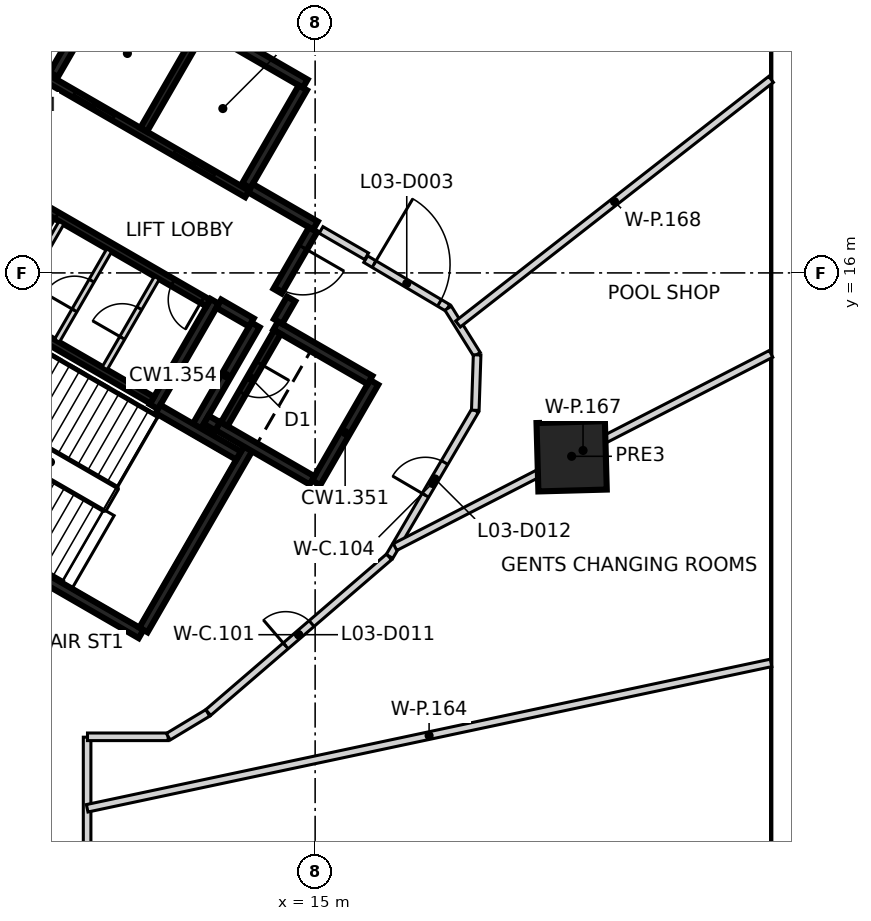
"""IFC4 building model, lengths in metres.
Left out: names, types, materials, properties, quantities, classifications, styles, units other than length and angle.
Written with IfcOpenShell. Run it as: python <this file> out.ifc"""

import sys

from ifc_helpers import new_model, si_unit, direction, frame, frame_2d, origin, origin_2d, place, context, subcontext, project, spatial, rectangle, extrude, element, fill, save


model = new_model("IFC4")
c1 = context("Model", 3, precision=1e-05, world=origin(), true_north=direction((0.0, 1.0)))
c2 = subcontext(c1, "Body", "Model", "MODEL_VIEW")
j1 = project(units=[si_unit("LENGTHUNIT", "METRE"), si_unit("PLANEANGLEUNIT", "RADIAN")], contexts=[c1])
p1 = place(None, origin())
s1 = spatial("IfcSite", under=j1, at=p1, CompositionType="ELEMENT")
p2 = place(p1, origin())
s2 = spatial("IfcBuilding", under=s1, at=p2, CompositionType="ELEMENT")
p3 = place(p2, frame((0.0, 0.0, 19.5)))
s3 = spatial("IfcBuildingStorey", under=s2, at=p3, CompositionType="ELEMENT", Elevation=19.5)
p4 = place(p3, frame((21.749, 11.174, -0.35), z_axis=(0.0, 0.0, 1.0), x_axis=(0.999628128016, 0.02726913418, 0.0)))
e1 = element("IfcColumn", 1, at=p4, inside=s3, PredefinedType="COLUMN", context=c2, shape_type="SweptSolid", body=[
    extrude(rectangle(XDim=1.8, YDim=1.8, at=origin_2d()), origin(), (0.0, 0.0, 1.0), 2.5),
])
p5 = place(p3, frame((10.42, 6.498, 0.0), z_axis=(0.0, 0.0, 1.0), x_axis=(-0.866021906294, 0.500006057782, 0.0)))
e2 = element("IfcWall", 2, at=p5, inside=s3, PredefinedType="SHEAR", context=c2, shape_type="SweptSolid", body=[
    extrude(rectangle(XDim=11.55, YDim=0.25, at=frame_2d((5.775, 0.0))), origin(), (0.0, 0.0, 1.0), 4.55),
])
p6 = place(p5, frame((10.025, 0.0, 0.0)))
e3 = element("IfcOpeningElement", 3, at=p6, cuts=e2, PredefinedType="OPENING", context=c2, shape_type="SweptSolid", body=[
    extrude(rectangle(XDim=1.2, YDim=2.1, at=frame_2d((0.6, 1.05))), frame((0.0, 0.135, 0.0), z_axis=(0.0, -1.0, 0.0), x_axis=(1.0, 0.0, 0.0)), (0.0, 0.0, 1.0), 0.27),
])
p7 = place(p5, frame((8.725, 0.0, 0.0)))
e4 = element("IfcOpeningElement", 4, at=p7, cuts=e2, PredefinedType="OPENING", context=c2, shape_type="SweptSolid", body=[
    extrude(rectangle(XDim=1.2, YDim=2.1, at=frame_2d((0.6, 1.05))), frame((0.0, 0.135, 0.0), z_axis=(0.0, -1.0, 0.0), x_axis=(1.0, 0.0, 0.0)), (0.0, 0.0, 1.0), 0.27),
])
p8 = place(p3, frame((9.673, 23.903, 0.0), z_axis=(0.0, 0.0, 1.0), x_axis=(0.86603616409, -0.499981362141, 0.0)))
e5 = element("IfcWall", 5, at=p8, inside=s3, PredefinedType="SHEAR", context=c2, shape_type="SweptSolid", body=[
    extrude(rectangle(XDim=5.85, YDim=0.25, at=frame_2d((2.925, 0.0))), origin(), (0.0, 0.0, 1.0), 4.55),
])
p9 = place(p3, frame((13.238, 11.378, 0.0), z_axis=(0.0, 0.0, 1.0), x_axis=(-0.500008851346, -0.866020293397, 0.0)))
e6 = element("IfcWall", 6, at=p9, inside=s3, PredefinedType="SHEAR", context=c2, shape_type="SweptSolid", body=[
    extrude(rectangle(XDim=5.51, YDim=0.25, at=frame_2d((2.755, 0.0))), origin(), (0.0, 0.0, 1.0), 4.55),
])
p10 = place(p3, frame((12.357, 15.252, 0.0), z_axis=(0.0, 0.0, 1.0), x_axis=(-0.500028443584, -0.866008981251, 0.0)))
e7 = element("IfcWall", 7, at=p10, inside=s3, PredefinedType="SHEAR", context=c2, shape_type="SweptSolid", body=[
    extrude(rectangle(XDim=3.2, YDim=0.25, at=frame_2d((1.6, 0.0))), origin(), (0.0, 0.0, 1.0), 4.55),
])
for number, where, z_axis, x_axis in (
    (8, (8.123, 21.219, 0.0), (0.0, 0.0, 1.0), (0.5, 0.866, 0.0)),
    (9, (14.676, 20.87, 0.0), (0.0, 0.0, 1.0), (-0.5, -0.866, 0.0)),
):
    element("IfcWall", number, at=place(p3, frame(where, z_axis=z_axis, x_axis=x_axis)), inside=s3, PredefinedType="SHEAR", context=c2, shape_type="SweptSolid", body=[
        extrude(rectangle(XDim=2.975, YDim=0.25, at=frame_2d((1.487, 0.0))), origin(), (0.0, 0.0, 1.0), 4.55),
    ])
p11 = place(p3, frame((16.552, 13.119, 0.0), z_axis=(0.0, 0.0, 1.0), x_axis=(-0.499978833458, -0.866037623948, 0.0)))
e10 = element("IfcWall", 10, at=p11, inside=s3, PredefinedType="SHEAR", context=c2, shape_type="SweptSolid", body=[
    extrude(rectangle(XDim=3.05, YDim=0.25, at=frame_2d((1.525, 0.0))), origin(), (0.0, 0.0, 1.0), 4.55),
])
p12 = place(p3, frame((14.918, 10.54, 0.0), z_axis=(0.0, 0.0, 1.0), x_axis=(-0.866063538972, 0.499933942099, 0.0)))
e11 = element("IfcWall", 11, at=p12, inside=s3, PredefinedType="SHEAR", context=c2, shape_type="SweptSolid", body=[
    extrude(rectangle(XDim=2.865, YDim=0.25, at=frame_2d((1.432, 0.0))), origin(), (0.0, 0.0, 1.0), 4.55),
])
p13 = place(p3, frame((13.963, 14.614, 0.0), z_axis=(0.0, 0.0, 1.0), x_axis=(0.866042235819, -0.499970844928, 0.0)))
e12 = element("IfcWall", 12, at=p13, inside=s3, PredefinedType="SHEAR", context=c2, shape_type="SweptSolid", body=[
    extrude(rectangle(XDim=2.865, YDim=0.25, at=frame_2d((1.432, 0.0))), origin(), (0.0, 0.0, 1.0), 4.55),
])
p14 = place(p3, frame((11.888, 11.961, 0.0), z_axis=(0.0, 0.0, 1.0), x_axis=(0.500003324108, 0.866023484601, 0.0)))
e13 = element("IfcWall", 13, at=p14, inside=s3, PredefinedType="SHEAR", context=c2, shape_type="SweptSolid", body=[
    extrude(rectangle(XDim=3.085, YDim=0.25, at=frame_2d((1.542, 0.0))), origin(), (0.0, 0.0, 1.0), 4.55),
])
p15 = place(p3, frame((10.865, 12.418, 0.0), z_axis=(0.0, 0.0, 1.0), x_axis=(0.866026229868, -0.499998569178, 0.0)))
e14 = element("IfcWall", 14, at=p15, inside=s3, PredefinedType="SHEAR", context=c2, shape_type="SweptSolid", body=[
    extrude(rectangle(XDim=2.449, YDim=0.25, at=frame_2d((1.225, 0.0))), origin(), (0.0, 0.0, 1.0), 4.55),
])
p16 = place(p3, frame((13.297, 18.231, 0.0), z_axis=(0.0, 0.0, 1.0), x_axis=(0.866043531843, -0.499968599967, 0.0)))
e15 = element("IfcWall", 15, at=p16, inside=s3, PredefinedType="SHEAR", context=c2, shape_type="SweptSolid", body=[
    extrude(rectangle(XDim=1.975, YDim=0.25, at=frame_2d((0.987, 0.0))), origin(), (0.0, 0.0, 1.0), 4.55),
])
p17 = place(p3, frame((14.945, 17.135, 0.0), z_axis=(0.0, 0.0, 1.0), x_axis=(-0.499983108224, -0.866035156036, 0.0)))
e16 = element("IfcWall", 16, at=p17, inside=s3, PredefinedType="SHEAR", context=c2, shape_type="SweptSolid", body=[
    extrude(rectangle(XDim=1.865, YDim=0.25, at=frame_2d((0.932, 0.0))), origin(), (0.0, 0.0, 1.0), 4.55),
])
p18 = place(p17, frame((0.535, 0.0, 0.0)))
e17 = element("IfcOpeningElement", 17, at=p18, cuts=e16, PredefinedType="OPENING", context=c2, shape_type="SweptSolid", body=[
    extrude(rectangle(XDim=1.25, YDim=2.1, at=frame_2d((0.625, 1.05))), frame((0.0, 0.135, 0.0), z_axis=(0.0, -1.0, 0.0), x_axis=(1.0, 0.0, 0.0)), (0.0, 0.0, 1.0), 0.27),
])
p19 = place(p3, frame((13.322, 14.695, 0.0), z_axis=(0.0, 0.0, 1.0), x_axis=(-0.866017078145, 0.500014420154, 0.0)))
e18 = element("IfcWall", 18, at=p19, inside=s3, PredefinedType="SHEAR", context=c2, shape_type="SweptSolid", body=[
    extrude(rectangle(XDim=0.989, YDim=0.25, at=frame_2d((0.495, 0.0))), origin(), (0.0, 0.0, 1.0), 4.55),
])
p20 = place(p3, frame((14.368, 15.315, 0.0), z_axis=(0.0, 0.0, 1.0), x_axis=(-0.499897359611, -0.866084655132, 0.0)))
e19 = element("IfcWall", 19, at=p20, inside=s3, PredefinedType="SHEAR", context=c2, shape_type="SweptSolid", body=[
    extrude(rectangle(XDim=0.685, YDim=0.25, at=frame_2d((0.342, 0.0))), origin(), (0.0, 0.0, 1.0), 4.55),
])
p21 = place(p3, frame((12.433, 11.964, 0.0), z_axis=(0.0, 0.0, 1.0), x_axis=(-0.866055875208, 0.499947218231, 0.0)))
e20 = element("IfcWall", 20, at=p21, inside=s3, PredefinedType="SHEAR", context=c2, shape_type="SweptSolid", body=[
    extrude(rectangle(XDim=0.345, YDim=0.25, at=frame_2d((0.172, 0.0))), origin(), (0.0, 0.0, 1.0), 4.55),
])
p22 = place(p3, frame((13.21, 18.08, 0.0), z_axis=(0.0, 0.0, 1.0), x_axis=(-0.866030299012, 0.499991521122, 0.0)))
e21 = element("IfcWall", 21, at=p22, inside=s3, PredefinedType="SHEAR", context=c2, shape_type="SweptSolid", body=[
    extrude(rectangle(XDim=6.1, YDim=0.2, at=frame_2d((3.05, 0.0))), origin(), (0.0, 0.0, 1.0), 4.55),
])
p23 = place(p22, frame((1.0, 0.0, 0.0)))
e22 = element("IfcOpeningElement", 22, at=p23, cuts=e21, PredefinedType="OPENING", context=c2, shape_type="SweptSolid", body=[
    extrude(rectangle(XDim=1.2, YDim=2.1, at=frame_2d((0.6, 1.05))), frame((0.0, 0.11, 0.0), z_axis=(0.0, -1.0, 0.0), x_axis=(1.0, 0.0, 0.0)), (0.0, 0.0, 1.0), 0.22),
])
p24 = place(p22, frame((4.05, 0.0, 0.0)))
e23 = element("IfcOpeningElement", 23, at=p24, cuts=e21, PredefinedType="OPENING", context=c2, shape_type="SweptSolid", body=[
    extrude(rectangle(XDim=1.2, YDim=2.1, at=frame_2d((0.6, 1.05))), frame((0.0, 0.11, 0.0), z_axis=(0.0, -1.0, 0.0), x_axis=(1.0, 0.0, 0.0)), (0.0, 0.0, 1.0), 0.22),
])
p25 = place(p3, frame((5.775, 15.502, 0.0), z_axis=(0.0, 0.0, 1.0), x_axis=(0.866020080793, -0.500009219579, 0.0)))
e24 = element("IfcWall", 24, at=p25, inside=s3, PredefinedType="SHEAR", context=c2, shape_type="SweptSolid", body=[
    extrude(rectangle(XDim=5.699, YDim=0.2, at=frame_2d((2.85, 0.0))), origin(), (0.0, 0.0, 1.0), 4.55),
])
p26 = place(p3, frame((12.185, 15.207, 0.0), z_axis=(0.0, 0.0, 1.0), x_axis=(-0.866020080793, 0.500009219579, 0.0)))
e25 = element("IfcWall", 25, at=p26, inside=s3, PredefinedType="SHEAR", context=c2, shape_type="SweptSolid", body=[
    extrude(rectangle(XDim=5.699, YDim=0.2, at=frame_2d((2.85, 0.0))), origin(), (0.0, 0.0, 1.0), 4.55),
])
p27 = place(p26, frame((0.174, 0.0, 0.0)))
e26 = element("IfcOpeningElement", 26, at=p27, cuts=e25, PredefinedType="OPENING", context=c2, shape_type="SweptSolid", body=[
    extrude(rectangle(XDim=0.9, YDim=2.1, at=frame_2d((0.45, 1.05))), frame((0.0, 0.11, 0.0), z_axis=(0.0, -1.0, 0.0), x_axis=(1.0, 0.0, 0.0)), (0.0, 0.0, 1.0), 0.22),
])
p28 = place(p26, frame((4.599, 0.0, 0.0)))
e27 = element("IfcOpeningElement", 27, at=p28, cuts=e25, PredefinedType="OPENING", context=c2, shape_type="SweptSolid", body=[
    extrude(rectangle(XDim=0.9, YDim=2.1, at=frame_2d((0.45, 1.05))), frame((0.0, 0.11, 0.0), z_axis=(0.0, -1.0, 0.0), x_axis=(1.0, 0.0, 0.0)), (0.0, 0.0, 1.0), 0.22),
])
p29 = place(p3, frame((10.489, 19.767, 0.0), z_axis=(0.0, 0.0, 1.0), x_axis=(0.499946628782, 0.866056215479, 0.0)))
e28 = element("IfcWall", 28, at=p29, inside=s3, PredefinedType="SHEAR", context=c2, shape_type="SweptSolid", body=[
    extrude(rectangle(XDim=3.048, YDim=0.2, at=frame_2d((1.524, 0.0))), origin(), (0.0, 0.0, 1.0), 4.55),
])
p30 = place(p3, frame((14.008, 14.442, 0.0), z_axis=(0.0, 0.0, 1.0), x_axis=(-0.499986818241, -0.866033014143, 0.0)))
e29 = element("IfcWall", 29, at=p30, inside=s3, PredefinedType="SHEAR", context=c2, shape_type="SweptSolid", body=[
    extrude(rectangle(XDim=2.798, YDim=0.2, at=frame_2d((1.399, 0.0))), origin(), (0.0, 0.0, 1.0), 4.55),
])
p31 = place(p30, frame((0.949, 0.0, 0.0)))
e30 = element("IfcOpeningElement", 30, at=p31, cuts=e29, PredefinedType="OPENING", context=c2, shape_type="SweptSolid", body=[
    extrude(rectangle(XDim=0.9, YDim=2.1, at=frame_2d((0.45, 1.05))), frame((0.0, 0.11, 0.0), z_axis=(0.0, -1.0, 0.0), x_axis=(1.0, 0.0, 0.0)), (0.0, 0.0, 1.0), 0.22),
])
p32 = place(p3, frame((9.462, 13.489, 0.0), z_axis=(0.0, 0.0, 1.0), x_axis=(0.50002746344, 0.86600954718, 0.0)))
e31 = element("IfcWall", 31, at=p32, inside=s3, PredefinedType="PARTITIONING", context=c2, shape_type="SweptSolid", body=[
    extrude(rectangle(XDim=2.748, YDim=0.15, at=frame_2d((1.374, 0.0))), origin(), (0.0, 0.0, 1.0), 4.55),
])
p33 = place(p32, frame((0.924, 0.0, 0.0)))
e32 = element("IfcOpeningElement", 32, at=p33, cuts=e31, PredefinedType="OPENING", context=c2, shape_type="SweptSolid", body=[
    extrude(rectangle(XDim=0.9, YDim=2.1, at=frame_2d((0.45, 1.05))), frame((0.0, 0.085, 0.0), z_axis=(0.0, -1.0, 0.0), x_axis=(1.0, 0.0, 0.0)), (0.0, 0.0, 1.0), 0.17),
])
p34 = place(p3, frame((8.207, 14.214, 0.0), z_axis=(0.0, 0.0, 1.0), x_axis=(0.499922376475, 0.866070215109, 0.0)))
e33 = element("IfcWall", 33, at=p34, inside=s3, PredefinedType="PARTITIONING", context=c2, shape_type="SweptSolid", body=[
    extrude(rectangle(XDim=2.749, YDim=0.15, at=frame_2d((1.374, 0.0))), origin(), (0.0, 0.0, 1.0), 4.55),
])
p35 = place(p34, frame((0.924, 0.0, 0.0)))
e34 = element("IfcOpeningElement", 34, at=p35, cuts=e33, PredefinedType="OPENING", context=c2, shape_type="SweptSolid", body=[
    extrude(rectangle(XDim=0.9, YDim=2.1, at=frame_2d((0.45, 1.05))), frame((0.0, 0.085, 0.0), z_axis=(0.0, -1.0, 0.0), x_axis=(1.0, 0.0, 0.0)), (0.0, 0.0, 1.0), 0.17),
])
p36 = place(p3, frame((6.951, 14.939, 0.0), z_axis=(0.0, 0.0, 1.0), x_axis=(0.50002746344, 0.86600954718, 0.0)))
e35 = element("IfcWall", 35, at=p36, inside=s3, PredefinedType="PARTITIONING", context=c2, shape_type="SweptSolid", body=[
    extrude(rectangle(XDim=2.748, YDim=0.15, at=frame_2d((1.374, 0.0))), origin(), (0.0, 0.0, 1.0), 4.55),
])
p37 = place(p3, frame((9.0, -4.787, 0.0), z_axis=(0.0, 0.0, 1.0), x_axis=(0.0, 1.0, 0.0)))
e36 = element("IfcWall", 36, at=p37, inside=s3, PredefinedType="PARTITIONING", context=c2, shape_type="SweptSolid", body=[
    extrude(rectangle(XDim=8.571, YDim=0.2, at=frame_2d((4.286, 0.0))), origin(), (0.0, 0.0, 1.0), 4.55),
])
p38 = place(p37, frame((3.606, 0.0, 0.0)))
e37 = element("IfcOpeningElement", 37, at=p38, cuts=e36, PredefinedType="OPENING", context=c2, shape_type="SweptSolid", body=[
    extrude(rectangle(XDim=1.0, YDim=2.1, at=frame_2d((0.5, 1.05))), frame((0.0, 0.11, 0.0), z_axis=(0.0, -1.0, 0.0), x_axis=(1.0, 0.0, 0.0)), (0.0, 0.0, 1.0), 0.22),
])
p39 = place(p3, frame((9.01, 3.794, 0.0), z_axis=(0.0, 0.0, 1.0), x_axis=(1.0, 0.0, 0.0)))
e38 = element("IfcWall", 38, at=p39, inside=s3, PredefinedType="PARTITIONING", context=c2, shape_type="SweptSolid", body=[
    extrude(rectangle(XDim=2.122, YDim=0.2, at=frame_2d((1.061, 0.0))), origin(), (0.0, 0.0, 1.0), 4.55),
])
p40 = place(p3, frame((11.136, 3.797, 0.0), z_axis=(0.0, 0.0, 1.0), x_axis=(0.856568110317, 0.516033983753, 0.0)))
e39 = element("IfcWall", 39, at=p40, inside=s3, PredefinedType="PARTITIONING", context=c2, shape_type="SweptSolid", body=[
    extrude(rectangle(XDim=1.213, YDim=0.2, at=frame_2d((0.606, 0.0))), origin(), (0.0, 0.0, 1.0), 4.55),
])
p41 = place(p3, frame((12.187, 4.433, 0.0), z_axis=(0.0, 0.0, 1.0), x_axis=(0.757945584444, 0.652317783769, 0.0)))
e40 = element("IfcWall", 40, at=p41, inside=s3, PredefinedType="PARTITIONING", context=c2, shape_type="SweptSolid", body=[
    extrude(rectangle(XDim=6.278, YDim=0.2, at=frame_2d((3.139, 0.0))), origin(), (0.0, 0.0, 1.0), 4.55),
])
p42 = place(p41, frame((2.689, 0.0, 0.0)))
e41 = element("IfcOpeningElement", 41, at=p42, cuts=e40, PredefinedType="OPENING", context=c2, shape_type="SweptSolid", body=[
    extrude(rectangle(XDim=0.9, YDim=2.1, at=frame_2d((0.45, 1.05))), frame((0.0, 0.11, 0.0), z_axis=(0.0, -1.0, 0.0), x_axis=(1.0, 0.0, 0.0)), (0.0, 0.0, 1.0), 0.22),
])
p43 = place(p3, frame((15.156, 17.131, 0.0), z_axis=(0.0, 0.0, 1.0), x_axis=(0.865639364436, -0.500668044455, 0.0)))
e42 = element("IfcWall", 42, at=p43, inside=s3, PredefinedType="PARTITIONING", context=c2, shape_type="SweptSolid", body=[
    extrude(rectangle(XDim=1.385, YDim=0.2, at=frame_2d((0.693, 0.0))), origin(), (0.0, 0.0, 1.0), 4.55),
])
p44 = place(p3, frame((16.331, 16.362, 0.0), z_axis=(0.0, 0.0, 1.0), x_axis=(0.860005465563, -0.510284821645, 0.0)))
e43 = element("IfcWall", 43, at=p44, inside=s3, PredefinedType="PARTITIONING", context=c2, shape_type="SweptSolid", body=[
    extrude(rectangle(XDim=2.51, YDim=0.2, at=frame_2d((1.255, 0.0))), origin(), (0.0, 0.0, 1.0), 4.55),
])
p45 = place(p44, frame((0.255, 0.0, 0.0)))
e44 = element("IfcOpeningElement", 44, at=p45, cuts=e43, PredefinedType="OPENING", context=c2, shape_type="SweptSolid", body=[
    extrude(rectangle(XDim=2.0, YDim=2.1, at=frame_2d((1.0, 1.05))), frame((0.0, 0.11, 0.0), z_axis=(0.0, -1.0, 0.0), x_axis=(1.0, 0.0, 0.0)), (0.0, 0.0, 1.0), 0.22),
])
p46 = place(p3, frame((16.957, 8.541, 0.0), z_axis=(0.0, 0.0, 1.0), x_axis=(0.506286576042, 0.862365295522, 0.0)))
e45 = element("IfcWall", 45, at=p46, inside=s3, PredefinedType="PARTITIONING", context=c2, shape_type="SweptSolid", body=[
    extrude(rectangle(XDim=4.452, YDim=0.2, at=frame_2d((2.226, 0.0))), origin(), (0.0, 0.0, 1.0), 4.55),
])
p47 = place(p46, frame((1.865, 0.0, 0.0)))
e46 = element("IfcOpeningElement", 46, at=p47, cuts=e45, PredefinedType="OPENING", context=c2, shape_type="SweptSolid", body=[
    extrude(rectangle(XDim=1.0, YDim=2.1, at=frame_2d((0.5, 1.05))), frame((0.0, 0.11, 0.0), z_axis=(0.0, -1.0, 0.0), x_axis=(1.0, 0.0, 0.0)), (0.0, 0.0, 1.0), 0.22),
])
p48 = place(p3, frame((18.499, 15.072, 0.0), z_axis=(0.0, 0.0, 1.0), x_axis=(0.529616815535, -0.848237012104, 0.0)))
e47 = element("IfcWall", 47, at=p48, inside=s3, PredefinedType="PARTITIONING", context=c2, shape_type="SweptSolid", body=[
    extrude(rectangle(XDim=1.436, YDim=0.2, at=frame_2d((0.718, 0.0))), origin(), (0.0, 0.0, 1.0), 4.55),
])
p49 = place(p3, frame((19.214, 12.385, 0.0), z_axis=(0.0, 0.0, 1.0), x_axis=(0.032802164331, 0.999461864213, 0.0)))
e48 = element("IfcWall", 48, at=p49, inside=s3, PredefinedType="PARTITIONING", context=c2, shape_type="SweptSolid", body=[
    extrude(rectangle(XDim=1.459, YDim=0.2, at=frame_2d((0.729, 0.0))), origin(), (0.0, 0.0, 1.0), 4.55),
])
p50 = place(p3, frame((9.002, 1.913, 0.0), z_axis=(0.0, 0.0, 1.0), x_axis=(0.978140632744, 0.20794446993, 0.0)))
e49 = element("IfcWall", 49, at=p50, inside=s3, PredefinedType="PARTITIONING", context=c2, shape_type="SweptSolid", body=[
    extrude(rectangle(XDim=18.395, YDim=0.2, at=frame_2d((9.198, 0.0))), origin(), (0.0, 0.0, 1.0), 2.15),
])
p51 = place(p3, frame((17.103, 8.787, 0.0), z_axis=(0.0, 0.0, 1.0), x_axis=(0.889456094774, 0.457020629151, 0.0)))
e50 = element("IfcWall", 50, at=p51, inside=s3, PredefinedType="PARTITIONING", context=c2, shape_type="SweptSolid", body=[
    extrude(rectangle(XDim=11.122, YDim=0.2, at=frame_2d((5.561, 0.0))), origin(), (0.0, 0.0, 1.0), 2.15),
])
p52 = place(p3, frame((18.759, 14.656, 0.0), z_axis=(0.0, 0.0, 1.0), x_axis=(0.787985777089, 0.615693442474, 0.0)))
e51 = element("IfcWall", 51, at=p52, inside=s3, PredefinedType="PARTITIONING", context=c2, shape_type="SweptSolid", body=[
    extrude(rectangle(XDim=10.453, YDim=0.2, at=frame_2d((5.227, 0.0))), origin(), (0.0, 0.0, 1.0), 2.15),
])
p53 = place(p23, origin())
e52 = element("IfcDoor", 52, at=p53, inside=s3, OperationType="DOUBLE_DOOR_SLIDING", PredefinedType="DOOR", context=c2, shape_type="SweptSolid", body=[
    extrude(rectangle(XDim=1.2, YDim=2.1, at=frame_2d((0.6, 1.05))), frame((0.0, 0.025, 0.0), z_axis=(0.0, -1.0, 0.0), x_axis=(1.0, 0.0, 0.0)), (0.0, 0.0, 1.0), 0.05),
])
fill(e22, e52)
p54 = place(p24, origin())
e53 = element("IfcDoor", 53, at=p54, inside=s3, OperationType="DOUBLE_DOOR_SLIDING", PredefinedType="DOOR", context=c2, shape_type="SweptSolid", body=[
    extrude(rectangle(XDim=1.2, YDim=2.1, at=frame_2d((0.6, 1.05))), frame((0.0, 0.025, 0.0), z_axis=(0.0, -1.0, 0.0), x_axis=(1.0, 0.0, 0.0)), (0.0, 0.0, 1.0), 0.05),
])
fill(e23, e53)
p55 = place(p18, origin())
e54 = element("IfcDoor", 54, at=p55, inside=s3, OperationType="SINGLE_SWING_LEFT", PredefinedType="DOOR", context=c2, shape_type="SweptSolid", body=[
    extrude(rectangle(XDim=1.25, YDim=2.1, at=frame_2d((0.625, 1.05))), frame((0.0, 0.025, 0.0), z_axis=(0.0, -1.0, 0.0), x_axis=(1.0, 0.0, 0.0)), (0.0, 0.0, 1.0), 0.05),
])
fill(e17, e54)
p56 = place(p27, origin())
e55 = element("IfcDoor", 55, at=p56, inside=s3, OperationType="SINGLE_SWING_LEFT", PredefinedType="DOOR", context=c2, shape_type="SweptSolid", body=[
    extrude(rectangle(XDim=0.9, YDim=2.1, at=frame_2d((0.45, 1.05))), frame((0.0, 0.025, 0.0), z_axis=(0.0, -1.0, 0.0), x_axis=(1.0, 0.0, 0.0)), (0.0, 0.0, 1.0), 0.05),
])
fill(e26, e55)
p57 = place(p33, origin())
e56 = element("IfcDoor", 56, at=p57, inside=s3, OperationType="SINGLE_SWING_RIGHT", PredefinedType="DOOR", context=c2, shape_type="SweptSolid", body=[
    extrude(rectangle(XDim=0.9, YDim=2.1, at=frame_2d((0.45, 1.05))), frame((0.0, 0.025, 0.0), z_axis=(0.0, -1.0, 0.0), x_axis=(1.0, 0.0, 0.0)), (0.0, 0.0, 1.0), 0.05),
])
fill(e32, e56)
p58 = place(p35, origin())
e57 = element("IfcDoor", 57, at=p58, inside=s3, OperationType="SINGLE_SWING_LEFT", PredefinedType="DOOR", context=c2, shape_type="SweptSolid", body=[
    extrude(rectangle(XDim=0.9, YDim=2.1, at=frame_2d((0.45, 1.05))), frame((0.0, 0.025, 0.0), z_axis=(0.0, -1.0, 0.0), x_axis=(1.0, 0.0, 0.0)), (0.0, 0.0, 1.0), 0.05),
])
fill(e34, e57)
p59 = place(p28, origin())
e58 = element("IfcDoor", 58, at=p59, inside=s3, OperationType="SINGLE_SWING_RIGHT", PredefinedType="DOOR", context=c2, shape_type="SweptSolid", body=[
    extrude(rectangle(XDim=0.9, YDim=2.1, at=frame_2d((0.45, 1.05))), frame((0.0, 0.025, 0.0), z_axis=(0.0, -1.0, 0.0), x_axis=(1.0, 0.0, 0.0)), (0.0, 0.0, 1.0), 0.05),
])
fill(e27, e58)
p60 = place(p31, origin())
e59 = element("IfcDoor", 59, at=p60, inside=s3, OperationType="SINGLE_SWING_LEFT", PredefinedType="DOOR", context=c2, shape_type="SweptSolid", body=[
    extrude(rectangle(XDim=0.9, YDim=2.1, at=frame_2d((0.45, 1.05))), frame((0.0, 0.025, 0.0), z_axis=(0.0, -1.0, 0.0), x_axis=(1.0, 0.0, 0.0)), (0.0, 0.0, 1.0), 0.05),
])
fill(e30, e59)
p61 = place(p45, origin())
e60 = element("IfcDoor", 60, at=p61, inside=s3, OperationType="DOUBLE_DOOR_SINGLE_SWING", PredefinedType="DOOR", context=c2, shape_type="SweptSolid", body=[
    extrude(rectangle(XDim=2.0, YDim=2.1, at=frame_2d((1.0, 1.05))), frame((0.0, 0.025, 0.0), z_axis=(0.0, -1.0, 0.0), x_axis=(1.0, 0.0, 0.0)), (0.0, 0.0, 1.0), 0.05),
])
fill(e44, e60)
p62 = place(p42, frame((0.9, 0.0, 0.0), z_axis=(0.0, 0.0, 1.0), x_axis=(-1.0, 0.0, 0.0)))
e61 = element("IfcDoor", 61, at=p62, inside=s3, OperationType="SINGLE_SWING_LEFT", PredefinedType="DOOR", context=c2, shape_type="SweptSolid", body=[
    extrude(rectangle(XDim=0.9, YDim=2.1, at=frame_2d((0.45, 1.05))), frame((0.0, 0.025, 0.0), z_axis=(0.0, -1.0, 0.0), x_axis=(1.0, 0.0, 0.0)), (0.0, 0.0, 1.0), 0.05),
])
fill(e41, e61)
p63 = place(p47, frame((1.0, 0.0, 0.0), z_axis=(0.0, 0.0, 1.0), x_axis=(-1.0, 0.0, 0.0)))
e62 = element("IfcDoor", 62, at=p63, inside=s3, OperationType="SINGLE_SWING_LEFT", PredefinedType="DOOR", context=c2, shape_type="SweptSolid", body=[
    extrude(rectangle(XDim=1.0, YDim=2.1, at=frame_2d((0.5, 1.05))), frame((0.0, 0.025, 0.0), z_axis=(0.0, -1.0, 0.0), x_axis=(1.0, 0.0, 0.0)), (0.0, 0.0, 1.0), 0.05),
])
fill(e46, e62)
save(model, sys.argv[1])
